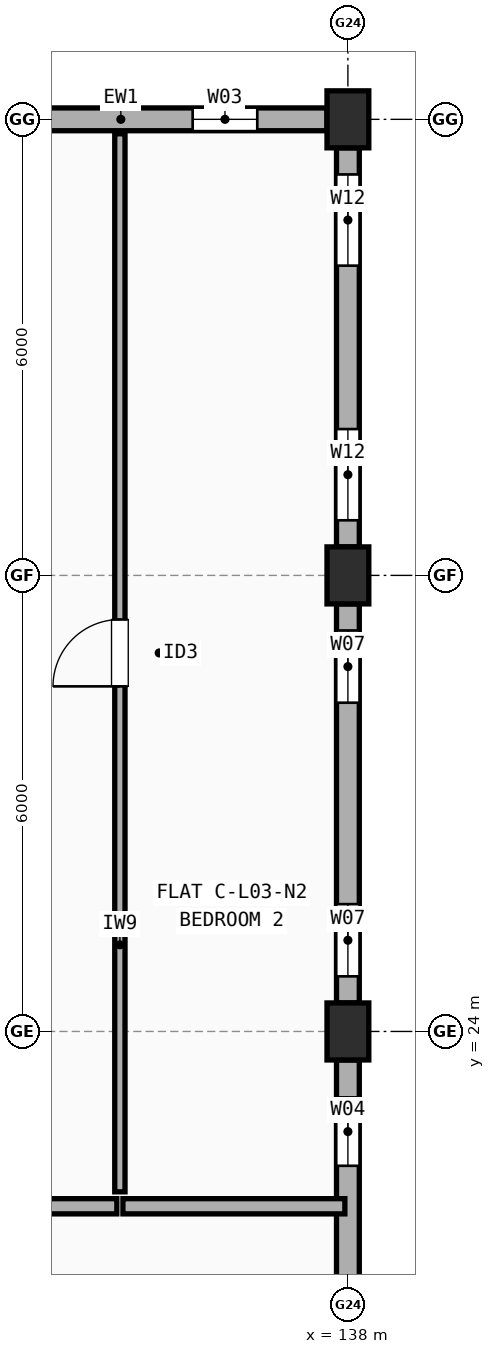
"""IFC4 building model, lengths in metres.
Left out: names, types, materials, properties, quantities, classifications, styles, units other than length and angle.
Written with IfcOpenShell. Run it as: python <this file> out.ifc"""

import sys

from ifc_helpers import new_model, si_unit, direction, frame, frame_2d, origin, origin_2d, place, context, subcontext, project, spatial, rectangle, extrude, element, fill, save


model = new_model("IFC4")
c1 = context("Model", 3, precision=1e-05, world=origin(), true_north=direction((0.0, 1.0)))
c2 = subcontext(c1, "Body", "Model", "MODEL_VIEW")
j1 = project(units=[si_unit("LENGTHUNIT", "METRE"), si_unit("PLANEANGLEUNIT", "RADIAN")], contexts=[c1])
p1 = place(None, origin())
s1 = spatial("IfcSite", under=j1, at=p1, CompositionType="ELEMENT")
p2 = place(p1, origin())
s2 = spatial("IfcBuilding", under=s1, at=p2, CompositionType="ELEMENT")
p3 = place(p2, frame((0.0, 0.0, 10.9)))
s3 = spatial("IfcBuildingStorey", under=s2, at=p3, CompositionType="ELEMENT", Elevation=10.9)
for number, where, z_axis, x_axis in (
    (1, (138.0, 24.0, 0.0), (0.0, 0.0, 1.0), (1.0, 0.0, 0.0)),
    (2, (138.0, 30.0, 0.0), (0.0, 0.0, 1.0), (1.0, 0.0, 0.0)),
    (3, (138.0, 36.0, 0.0), (0.0, 0.0, 1.0), (1.0, 0.0, 0.0)),
):
    element("IfcColumn", number, at=place(p3, frame(where, z_axis=z_axis, x_axis=x_axis)), inside=s3, PredefinedType="COLUMN", context=c2, shape_type="SweptSolid", body=[
        extrude(rectangle(XDim=0.55, YDim=0.75, at=origin_2d()), origin(), (0.0, 0.0, 1.0), 2.96),
    ])
p4 = place(p3, frame((138.0, 18.375, 0.0), z_axis=(0.0, 0.0, 1.0), x_axis=(0.0, 1.0, 0.0)))
e4 = element("IfcWall", 4, at=p4, inside=s3, PredefinedType="STANDARD", context=c2, shape_type="SweptSolid", body=[
    extrude(rectangle(XDim=5.25, YDim=0.3, at=frame_2d((2.625, 0.0))), origin(), (0.0, 0.0, 1.0), 2.442),
])
p5 = place(p4, frame((1.218, 0.0, 0.9)))
e5 = element("IfcOpeningElement", 5, at=p5, cuts=e4, PredefinedType="OPENING", context=c2, shape_type="SweptSolid", body=[
    extrude(rectangle(XDim=0.85, YDim=1.25, at=frame_2d((0.425, 0.625))), frame((0.0, 0.16, 0.0), z_axis=(0.0, -1.0, 0.0), x_axis=(1.0, 0.0, 0.0)), (0.0, 0.0, 1.0), 0.32),
])
p6 = place(p4, frame((3.857, 0.0, 0.9)))
e6 = element("IfcOpeningElement", 6, at=p6, cuts=e4, PredefinedType="OPENING", context=c2, shape_type="SweptSolid", body=[
    extrude(rectangle(XDim=0.9, YDim=1.3, at=frame_2d((0.45, 0.65))), frame((0.0, 0.16, 0.0), z_axis=(0.0, -1.0, 0.0), x_axis=(1.0, 0.0, 0.0)), (0.0, 0.0, 1.0), 0.32),
])
p7 = place(p3, frame((138.0, 24.375, 0.0), z_axis=(0.0, 0.0, 1.0), x_axis=(0.0, 1.0, 0.0)))
e7 = element("IfcWall", 7, at=p7, inside=s3, PredefinedType="STANDARD", context=c2, shape_type="SweptSolid", body=[
    extrude(rectangle(XDim=5.25, YDim=0.3, at=frame_2d((2.625, 0.0))), origin(), (0.0, 0.0, 1.0), 2.442),
])
p8 = place(p7, frame((0.35, 0.0, 0.9)))
e8 = element("IfcOpeningElement", 8, at=p8, cuts=e7, PredefinedType="OPENING", context=c2, shape_type="SweptSolid", body=[
    extrude(rectangle(XDim=0.95, YDim=1.35, at=frame_2d((0.475, 0.675))), frame((0.0, 0.16, 0.0), z_axis=(0.0, -1.0, 0.0), x_axis=(1.0, 0.0, 0.0)), (0.0, 0.0, 1.0), 0.32),
])
p9 = place(p7, frame((3.95, 0.0, 0.9)))
e9 = element("IfcOpeningElement", 9, at=p9, cuts=e7, PredefinedType="OPENING", context=c2, shape_type="SweptSolid", body=[
    extrude(rectangle(XDim=0.95, YDim=1.35, at=frame_2d((0.475, 0.675))), frame((0.0, 0.16, 0.0), z_axis=(0.0, -1.0, 0.0), x_axis=(1.0, 0.0, 0.0)), (0.0, 0.0, 1.0), 0.32),
])
p10 = place(p3, frame((138.0, 30.375, 0.0), z_axis=(0.0, 0.0, 1.0), x_axis=(0.0, 1.0, 0.0)))
e10 = element("IfcWall", 10, at=p10, inside=s3, PredefinedType="STANDARD", context=c2, shape_type="SweptSolid", body=[
    extrude(rectangle(XDim=5.25, YDim=0.3, at=frame_2d((2.625, 0.0))), origin(), (0.0, 0.0, 1.0), 2.442),
])
p11 = place(p10, frame((0.35, 0.0, 0.9)))
e11 = element("IfcOpeningElement", 11, at=p11, cuts=e10, PredefinedType="OPENING", context=c2, shape_type="SweptSolid", body=[
    extrude(rectangle(XDim=1.2, YDim=1.35, at=frame_2d((0.6, 0.675))), frame((0.0, 0.16, 0.0), z_axis=(0.0, -1.0, 0.0), x_axis=(1.0, 0.0, 0.0)), (0.0, 0.0, 1.0), 0.32),
])
p12 = place(p10, frame((3.7, 0.0, 0.9)))
e12 = element("IfcOpeningElement", 12, at=p12, cuts=e10, PredefinedType="OPENING", context=c2, shape_type="SweptSolid", body=[
    extrude(rectangle(XDim=1.2, YDim=1.35, at=frame_2d((0.6, 0.675))), frame((0.0, 0.16, 0.0), z_axis=(0.0, -1.0, 0.0), x_axis=(1.0, 0.0, 0.0)), (0.0, 0.0, 1.0), 0.32),
])
p13 = place(p3, frame((137.725, 36.0, 0.0), z_axis=(0.0, 0.0, 1.0), x_axis=(-1.0, 0.0, 0.0)))
e13 = element("IfcWall", 13, at=p13, inside=s3, PredefinedType="STANDARD", context=c2, shape_type="SweptSolid", body=[
    extrude(rectangle(XDim=5.45, YDim=0.3, at=frame_2d((2.725, 0.0))), origin(), (0.0, 0.0, 1.0), 2.442),
])
p14 = place(p13, frame((0.917, 0.0, 0.9)))
e14 = element("IfcOpeningElement", 14, at=p14, cuts=e13, PredefinedType="OPENING", context=c2, shape_type="SweptSolid", body=[
    extrude(rectangle(XDim=0.85, YDim=1.25, at=frame_2d((0.425, 0.625))), frame((0.0, 0.16, 0.0), z_axis=(0.0, -1.0, 0.0), x_axis=(1.0, 0.0, 0.0)), (0.0, 0.0, 1.0), 0.32),
])
p15 = place(p13, frame((3.657, 0.0, 0.9)))
e15 = element("IfcOpeningElement", 15, at=p15, cuts=e13, PredefinedType="OPENING", context=c2, shape_type="SweptSolid", body=[
    extrude(rectangle(XDim=0.9, YDim=1.3, at=frame_2d((0.45, 0.65))), frame((0.0, 0.16, 0.0), z_axis=(0.0, -1.0, 0.0), x_axis=(1.0, 0.0, 0.0)), (0.0, 0.0, 1.0), 0.32),
])
p16 = place(p3, frame((124.54, 21.7, 0.0), z_axis=(0.0, 0.0, 1.0), x_axis=(1.0, 0.0, 0.0)))
e16 = element("IfcWall", 16, at=p16, inside=s3, PredefinedType="SOLIDWALL", context=c2, shape_type="SweptSolid", body=[
    extrude(rectangle(XDim=10.42, YDim=0.2, at=frame_2d((5.21, 0.0))), origin(), (0.0, 0.0, 1.0), 2.442),
])
p17 = place(p16, frame((4.72, 0.0, 0.0)))
e17 = element("IfcOpeningElement", 17, at=p17, cuts=e16, PredefinedType="OPENING", context=c2, shape_type="SweptSolid", body=[
    extrude(rectangle(XDim=0.98, YDim=2.15, at=frame_2d((0.49, 1.075))), frame((0.0, 0.11, 0.0), z_axis=(0.0, -1.0, 0.0), x_axis=(1.0, 0.0, 0.0)), (0.0, 0.0, 1.0), 0.22),
])
p18 = place(p3, frame((135.04, 21.7, 0.0), z_axis=(0.0, 0.0, 1.0), x_axis=(1.0, 0.0, 0.0)))
e18 = element("IfcWall", 18, at=p18, inside=s3, PredefinedType="SOLIDWALL", context=c2, shape_type="SweptSolid", body=[
    extrude(rectangle(XDim=2.92, YDim=0.2, at=frame_2d((1.46, 0.0))), origin(), (0.0, 0.0, 1.0), 2.442),
])
p19 = place(p3, frame((135.0, 21.89, 0.0), z_axis=(0.0, 0.0, 1.0), x_axis=(0.0, 1.0, 0.0)))
e19 = element("IfcWall", 19, at=p19, inside=s3, PredefinedType="PARTITIONING", context=c2, shape_type="SweptSolid", body=[
    extrude(rectangle(XDim=13.92, YDim=0.135, at=frame_2d((6.96, 0.0))), origin(), (0.0, 0.0, 1.0), 2.442),
])
p20 = place(p19, frame((6.65, 0.0, 0.0)))
e20 = element("IfcOpeningElement", 20, at=p20, cuts=e19, PredefinedType="OPENING", context=c2, shape_type="SweptSolid", body=[
    extrude(rectangle(XDim=0.88, YDim=2.1, at=frame_2d((0.44, 1.05))), frame((0.0, 0.077, 0.0), z_axis=(0.0, -1.0, 0.0), x_axis=(1.0, 0.0, 0.0)), (0.0, 0.0, 1.0), 0.155),
])
p21 = place(p6, origin())
e21 = element("IfcWindow", 21, at=p21, inside=s3, PartitioningType="SINGLE_PANEL", PredefinedType="WINDOW", context=c2, shape_type="SweptSolid", body=[
    extrude(rectangle(XDim=0.9, YDim=1.3, at=frame_2d((0.45, 0.65))), frame((0.0, 0.03, 0.0), z_axis=(0.0, -1.0, 0.0), x_axis=(1.0, 0.0, 0.0)), (0.0, 0.0, 1.0), 0.06),
])
fill(e6, e21)
p22 = place(p8, origin())
e22 = element("IfcWindow", 22, at=p22, inside=s3, PartitioningType="SINGLE_PANEL", PredefinedType="WINDOW", context=c2, shape_type="SweptSolid", body=[
    extrude(rectangle(XDim=0.95, YDim=1.35, at=frame_2d((0.475, 0.675))), frame((0.0, 0.03, 0.0), z_axis=(0.0, -1.0, 0.0), x_axis=(1.0, 0.0, 0.0)), (0.0, 0.0, 1.0), 0.06),
])
fill(e8, e22)
p23 = place(p9, origin())
e23 = element("IfcWindow", 23, at=p23, inside=s3, PartitioningType="SINGLE_PANEL", PredefinedType="WINDOW", context=c2, shape_type="SweptSolid", body=[
    extrude(rectangle(XDim=0.95, YDim=1.35, at=frame_2d((0.475, 0.675))), frame((0.0, 0.03, 0.0), z_axis=(0.0, -1.0, 0.0), x_axis=(1.0, 0.0, 0.0)), (0.0, 0.0, 1.0), 0.06),
])
fill(e9, e23)
p24 = place(p11, origin())
e24 = element("IfcWindow", 24, at=p24, inside=s3, PartitioningType="SINGLE_PANEL", PredefinedType="WINDOW", context=c2, shape_type="SweptSolid", body=[
    extrude(rectangle(XDim=1.2, YDim=1.35, at=frame_2d((0.6, 0.675))), frame((0.0, 0.03, 0.0), z_axis=(0.0, -1.0, 0.0), x_axis=(1.0, 0.0, 0.0)), (0.0, 0.0, 1.0), 0.06),
])
fill(e11, e24)
p25 = place(p12, origin())
e25 = element("IfcWindow", 25, at=p25, inside=s3, PartitioningType="SINGLE_PANEL", PredefinedType="WINDOW", context=c2, shape_type="SweptSolid", body=[
    extrude(rectangle(XDim=1.2, YDim=1.35, at=frame_2d((0.6, 0.675))), frame((0.0, 0.03, 0.0), z_axis=(0.0, -1.0, 0.0), x_axis=(1.0, 0.0, 0.0)), (0.0, 0.0, 1.0), 0.06),
])
fill(e12, e25)
p26 = place(p14, origin())
e26 = element("IfcWindow", 26, at=p26, inside=s3, PartitioningType="SINGLE_PANEL", PredefinedType="WINDOW", context=c2, shape_type="SweptSolid", body=[
    extrude(rectangle(XDim=0.85, YDim=1.25, at=frame_2d((0.425, 0.625))), frame((0.0, 0.03, 0.0), z_axis=(0.0, -1.0, 0.0), x_axis=(1.0, 0.0, 0.0)), (0.0, 0.0, 1.0), 0.06),
])
fill(e14, e26)
p27 = place(p20, origin())
e27 = element("IfcDoor", 27, at=p27, inside=s3, OperationType="SINGLE_SWING_LEFT", PredefinedType="DOOR", context=c2, shape_type="SweptSolid", body=[
    extrude(rectangle(XDim=0.88, YDim=2.1, at=frame_2d((0.44, 1.05))), frame((0.0, 0.025, 0.0), z_axis=(0.0, -1.0, 0.0), x_axis=(1.0, 0.0, 0.0)), (0.0, 0.0, 1.0), 0.05),
])
fill(e20, e27)
save(model, sys.argv[1])
